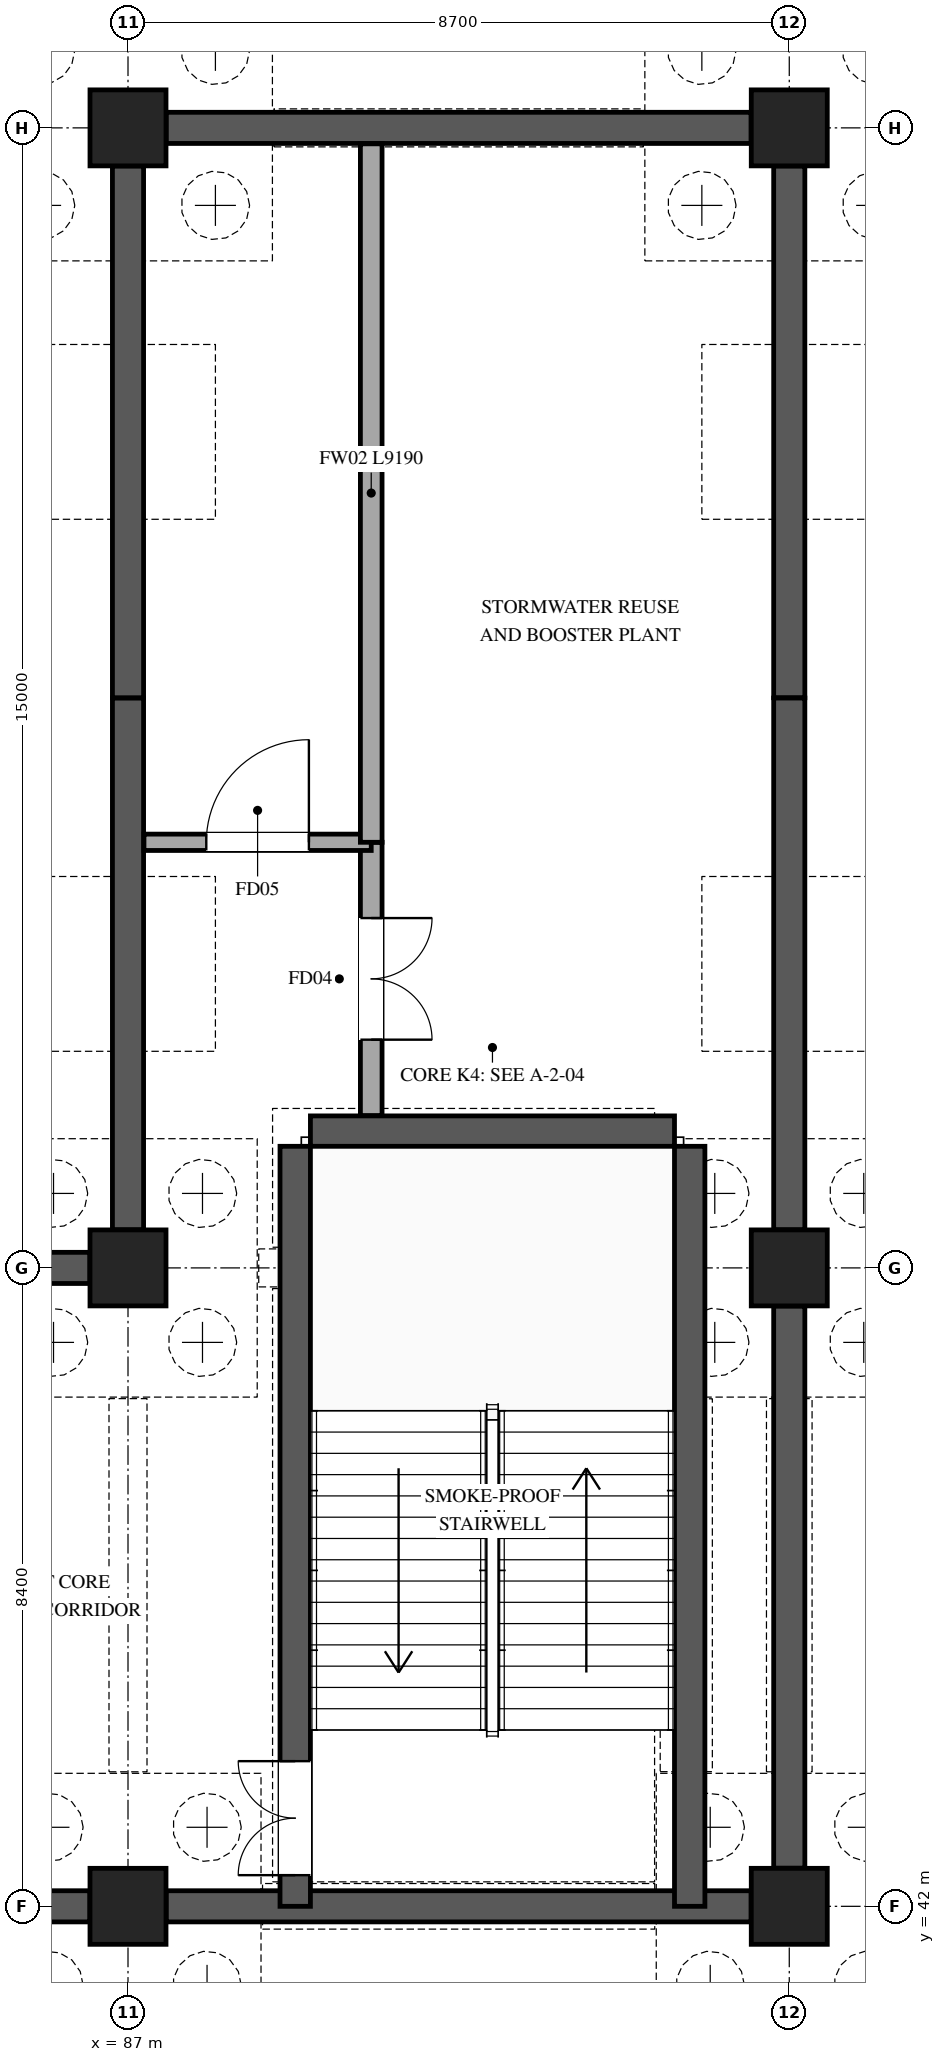
"""IFC4 building model, lengths in metres.
Left out: names, types, materials, properties, quantities, classifications, styles, units other than length and angle.
Written with IfcOpenShell. Run it as: python <this file> out.ifc"""

import sys

from ifc_helpers import new_model, si_unit, direction, frame, frame_2d, origin, origin_2d, place, context, subcontext, project, spatial, rectangle, extrude, element, fill, save


model = new_model("IFC4")
c1 = context("Model", 3, precision=1e-05, world=origin(), true_north=direction((0.0, 1.0)))
c2 = subcontext(c1, "Body", "Model", "MODEL_VIEW")
j1 = project(units=[si_unit("LENGTHUNIT", "METRE"), si_unit("PLANEANGLEUNIT", "RADIAN")], contexts=[c1])
p1 = place(None, origin())
s1 = spatial("IfcSite", under=j1, at=p1, CompositionType="ELEMENT")
p2 = place(p1, origin())
s2 = spatial("IfcBuilding", under=s1, at=p2, CompositionType="ELEMENT")
p3 = place(p2, frame((0.0, 0.0, -9.6)))
s3 = spatial("IfcBuildingStorey", under=s2, at=p3, CompositionType="ELEMENT", Elevation=-9.6)
for number, where, z_axis, x_axis in (
    (1, (87.0, 42.0, 0.0), (0.0, 0.0, 1.0), (1.0, 0.0, 0.0)),
    (2, (87.0, 50.4, 0.0), (0.0, 0.0, 1.0), (1.0, 0.0, 0.0)),
    (3, (87.0, 65.4, 0.0), (0.0, 0.0, 1.0), (1.0, 0.0, 0.0)),
    (4, (95.7, 42.0, 0.0), (0.0, 0.0, 1.0), (1.0, 0.0, 0.0)),
    (5, (95.7, 50.4, 0.0), (0.0, 0.0, 1.0), (1.0, 0.0, 0.0)),
    (6, (95.7, 65.4, 0.0), (0.0, 0.0, 1.0), (1.0, 0.0, 0.0)),
):
    element("IfcColumn", number, at=place(p3, frame(where, z_axis=z_axis, x_axis=x_axis)), inside=s3, PredefinedType="COLUMN", context=c2, shape_type="SweptSolid", body=[
        extrude(rectangle(XDim=1.0, YDim=1.0, at=origin_2d()), origin(), (0.0, 0.0, 1.0), 4.8),
    ])
p4 = place(p3, frame((78.802, 50.4, 0.0), z_axis=(0.0, 0.0, 1.0), x_axis=(1.0, 0.0, 0.0)))
e7 = element("IfcWall", 7, at=p4, inside=s3, PredefinedType="USERDEFINED", context=c2, shape_type="SweptSolid", body=[
    extrude(rectangle(XDim=7.696, YDim=0.41, at=frame_2d((3.848, 0.0))), origin(), (0.0, 0.0, 1.0), 4.48),
])
for number, where, z_axis, x_axis in (
    (8, (87.0, 50.902, 0.0), (0.0, 0.0, 1.0), (0.0, 1.0, 0.0)),
    (9, (87.0, 57.902, 0.0), (0.0, 0.0, 1.0), (0.0, 1.0, 0.0)),
):
    element("IfcWall", number, at=place(p3, frame(where, z_axis=z_axis, x_axis=x_axis)), inside=s3, PredefinedType="USERDEFINED", context=c2, shape_type="SweptSolid", body=[
        extrude(rectangle(XDim=6.996, YDim=0.41, at=frame_2d((3.498, 0.0))), origin(), (0.0, 0.0, 1.0), 4.48),
    ])
p5 = place(p3, frame((87.502, 65.4, 0.0), z_axis=(0.0, 0.0, 1.0), x_axis=(1.0, 0.0, 0.0)))
e10 = element("IfcWall", 10, at=p5, inside=s3, PredefinedType="USERDEFINED", context=c2, shape_type="SweptSolid", body=[
    extrude(rectangle(XDim=7.696, YDim=0.41, at=frame_2d((3.848, 0.0))), origin(), (0.0, 0.0, 1.0), 4.48),
])
for number, where, z_axis, x_axis in (
    (11, (95.7, 64.898, 0.0), (0.0, 0.0, 1.0), (0.0, -1.0, 0.0)),
    (12, (95.7, 57.898, 0.0), (0.0, 0.0, 1.0), (0.0, -1.0, 0.0)),
):
    element("IfcWall", number, at=place(p3, frame(where, z_axis=z_axis, x_axis=x_axis)), inside=s3, PredefinedType="USERDEFINED", context=c2, shape_type="SweptSolid", body=[
        extrude(rectangle(XDim=6.996, YDim=0.41, at=frame_2d((3.498, 0.0))), origin(), (0.0, 0.0, 1.0), 4.48),
    ])
p6 = place(p3, frame((95.7, 49.898, 0.0), z_axis=(0.0, 0.0, 1.0), x_axis=(0.0, -1.0, 0.0)))
e13 = element("IfcWall", 13, at=p6, inside=s3, PredefinedType="USERDEFINED", context=c2, shape_type="SweptSolid", body=[
    extrude(rectangle(XDim=7.396, YDim=0.41, at=frame_2d((3.698, 0.0))), origin(), (0.0, 0.0, 1.0), 4.48),
])
for number, where, z_axis, x_axis in (
    (14, (95.198, 42.0, 0.0), (0.0, 0.0, 1.0), (-1.0, 0.0, 0.0)),
    (15, (86.498, 42.0, 0.0), (0.0, 0.0, 1.0), (-1.0, 0.0, 0.0)),
):
    element("IfcWall", number, at=place(p3, frame(where, z_axis=z_axis, x_axis=x_axis)), inside=s3, PredefinedType="USERDEFINED", context=c2, shape_type="SweptSolid", body=[
        extrude(rectangle(XDim=7.696, YDim=0.41, at=frame_2d((3.848, 0.0))), origin(), (0.0, 0.0, 1.0), 4.48),
    ])
p7 = place(p3, frame((89.2, 42.0, 0.0), z_axis=(0.0, 0.0, 1.0), x_axis=(0.0, 1.0, 0.0)))
e16 = element("IfcWall", 16, at=p7, inside=s3, PredefinedType="SHEAR", context=c2, shape_type="SweptSolid", body=[
    extrude(rectangle(XDim=10.0, YDim=0.4, at=frame_2d((5.0, 0.0))), origin(), (0.0, 0.0, 1.0), 4.8),
])
p8 = place(p7, frame((0.41, 0.0, 0.0)))
e17 = element("IfcOpeningElement", 17, at=p8, cuts=e16, PredefinedType="OPENING", context=c2, shape_type="SweptSolid", body=[
    extrude(rectangle(XDim=1.5, YDim=2.2, at=frame_2d((0.75, 1.1))), frame((0.0, 0.21, 0.0), z_axis=(0.0, -1.0, 0.0), x_axis=(1.0, 0.0, 0.0)), (0.0, 0.0, 1.0), 0.42),
])
p9 = place(p3, frame((94.39, 52.0, 0.0), z_axis=(0.0, 0.0, 1.0), x_axis=(0.0, -1.0, 0.0)))
e18 = element("IfcWall", 18, at=p9, inside=s3, PredefinedType="SHEAR", context=c2, shape_type="SweptSolid", body=[
    extrude(rectangle(XDim=10.0, YDim=0.4, at=frame_2d((5.0, 0.0))), origin(), (0.0, 0.0, 1.0), 4.8),
])
p10 = place(p3, frame((89.4, 52.2, 0.0), z_axis=(0.0, 0.0, 1.0), x_axis=(1.0, 0.0, 0.0)))
e19 = element("IfcWall", 19, at=p10, inside=s3, PredefinedType="SHEAR", context=c2, shape_type="SweptSolid", body=[
    extrude(rectangle(XDim=4.79, YDim=0.4, at=frame_2d((2.395, 0.0))), origin(), (0.0, 0.0, 1.0), 4.8),
])
p11 = place(p3, frame((90.2, 56.0, 0.0), z_axis=(0.0, 0.0, 1.0), x_axis=(0.0, -1.0, 0.0)))
e20 = element("IfcWall", 20, at=p11, inside=s3, PredefinedType="STANDARD", context=c2, shape_type="SweptSolid", body=[
    extrude(rectangle(XDim=3.595, YDim=0.285, at=frame_2d((1.797, 0.0))), origin(), (0.0, 0.0, 1.0), 4.45),
])
p12 = place(p11, frame((0.997, 0.0, 0.0)))
e21 = element("IfcOpeningElement", 21, at=p12, cuts=e20, PredefinedType="OPENING", context=c2, shape_type="SweptSolid", body=[
    extrude(rectangle(XDim=1.6, YDim=2.25, at=frame_2d((0.8, 1.125))), frame((0.0, 0.152, 0.0), z_axis=(0.0, -1.0, 0.0), x_axis=(1.0, 0.0, 0.0)), (0.0, 0.0, 1.0), 0.305),
])
p13 = place(p3, frame((87.21, 56.0, 0.0), z_axis=(0.0, 0.0, 1.0), x_axis=(1.0, 0.0, 0.0)))
e22 = element("IfcWall", 22, at=p13, inside=s3, PredefinedType="PARTITIONING", context=c2, shape_type="SweptSolid", body=[
    extrude(rectangle(XDim=2.99, YDim=0.215, at=frame_2d((1.495, 0.0))), origin(), (0.0, 0.0, 1.0), 3.982),
])
p14 = place(p13, frame((0.82, 0.0, 0.0)))
e23 = element("IfcOpeningElement", 23, at=p14, cuts=e22, PredefinedType="OPENING", context=c2, shape_type="SweptSolid", body=[
    extrude(rectangle(XDim=1.35, YDim=2.2, at=frame_2d((0.675, 1.1))), frame((0.0, 0.118, 0.0), z_axis=(0.0, -1.0, 0.0), x_axis=(1.0, 0.0, 0.0)), (0.0, 0.0, 1.0), 0.235),
])
p15 = place(p3, frame((90.2, 56.0, 0.0), z_axis=(0.0, 0.0, 1.0), x_axis=(0.0, 1.0, 0.0)))
e24 = element("IfcWall", 24, at=p15, inside=s3, PredefinedType="STANDARD", context=c2, shape_type="SweptSolid", body=[
    extrude(rectangle(XDim=9.19, YDim=0.285, at=frame_2d((4.595, 0.0))), origin(), (0.0, 0.0, 1.0), 3.82),
])
p16 = place(p8, origin())
e25 = element("IfcDoor", 25, at=p16, inside=s3, OperationType="DOUBLE_DOOR_SINGLE_SWING", PredefinedType="DOOR", context=c2, shape_type="SweptSolid", body=[
    extrude(rectangle(XDim=1.5, YDim=2.2, at=frame_2d((0.75, 1.1))), frame((0.0, 0.025, 0.0), z_axis=(0.0, -1.0, 0.0), x_axis=(1.0, 0.0, 0.0)), (0.0, 0.0, 1.0), 0.05),
])
fill(e17, e25)
p17 = place(p12, origin())
e26 = element("IfcDoor", 26, at=p17, inside=s3, OperationType="DOUBLE_DOOR_SINGLE_SWING", PredefinedType="DOOR", context=c2, shape_type="SweptSolid", body=[
    extrude(rectangle(XDim=1.6, YDim=2.25, at=frame_2d((0.8, 1.125))), frame((0.0, 0.025, 0.0), z_axis=(0.0, -1.0, 0.0), x_axis=(1.0, 0.0, 0.0)), (0.0, 0.0, 1.0), 0.05),
])
fill(e21, e26)
p18 = place(p14, origin())
e27 = element("IfcDoor", 27, at=p18, inside=s3, OperationType="SINGLE_SWING_RIGHT", PredefinedType="DOOR", context=c2, shape_type="SweptSolid", body=[
    extrude(rectangle(XDim=1.35, YDim=2.2, at=frame_2d((0.675, 1.1))), frame((0.0, 0.025, 0.0), z_axis=(0.0, -1.0, 0.0), x_axis=(1.0, 0.0, 0.0)), (0.0, 0.0, 1.0), 0.05),
])
fill(e23, e27)
save(model, sys.argv[1])
